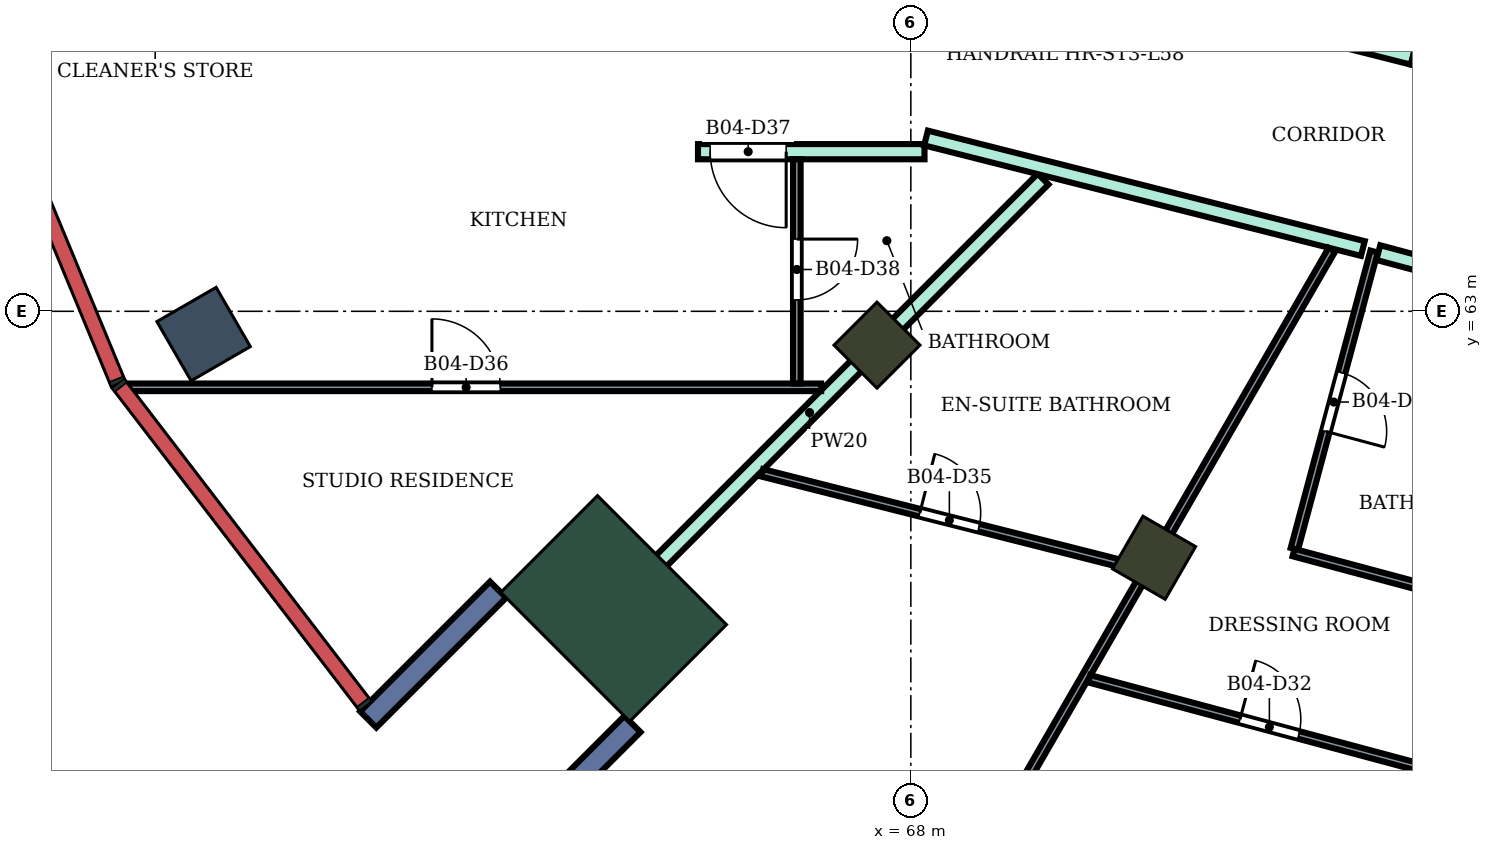
"""IFC4 building model, lengths in metres.
Left out: names, types, materials, properties, quantities, classifications, styles, units other than length and angle.
Written with IfcOpenShell. Run it as: python <this file> out.ifc"""

import sys

from ifc_helpers import new_model, si_unit, direction, frame, frame_2d, origin, origin_2d, place, context, subcontext, project, spatial, rectangle, extrude, element, fill, save


model = new_model("IFC4")
c1 = context("Model", 3, precision=1e-05, world=origin(), true_north=direction((0.0, 1.0)))
c2 = subcontext(c1, "Body", "Model", "MODEL_VIEW")
j1 = project(units=[si_unit("LENGTHUNIT", "METRE"), si_unit("PLANEANGLEUNIT", "RADIAN")], contexts=[c1])
p1 = place(None, origin())
s1 = spatial("IfcSite", under=j1, at=p1, CompositionType="ELEMENT")
p2 = place(p1, origin())
s2 = spatial("IfcBuilding", under=s1, at=p2, CompositionType="ELEMENT")
p3 = place(p2, frame((0.0, 0.0, 254.1)))
s3 = spatial("IfcBuildingStorey", under=s2, at=p3, CompositionType="ELEMENT", Elevation=254.1)
p4 = place(p3, frame((58.696, 62.7, 0.0), z_axis=(0.0, 0.0, 1.0), x_axis=(-0.866025403784, -0.5, 0.0)))
e1 = element("IfcColumn", 1, at=p4, inside=s3, PredefinedType="COLUMN", context=c2, shape_type="SweptSolid", body=[
    extrude(rectangle(XDim=0.9, YDim=0.9, at=origin_2d()), origin(), (0.0, 0.0, 1.0), 4.2),
])
for number, where, z_axis, x_axis in (
    (2, (67.555, 62.555, 0.0), (0.0, 0.0, 1.0), (-0.707, -0.707, 0.0)),
    (3, (71.2, 59.758, 0.0), (0.0, 0.0, 1.0), (-0.5, -0.866, 0.0)),
):
    element("IfcColumn", number, at=place(p3, frame(where, z_axis=z_axis, x_axis=x_axis)), inside=s3, PredefinedType="COLUMN", context=c2, shape_type="SweptSolid", body=[
        extrude(rectangle(XDim=0.8, YDim=0.8, at=origin_2d()), origin(), (0.0, 0.0, 1.0), 4.2),
    ])
p5 = place(p3, frame((64.09, 59.09, 0.0), z_axis=(0.0, 0.0, 1.0), x_axis=(-0.707106781187, -0.707106781187, 0.0)))
e4 = element("IfcColumn", 4, at=p5, inside=s3, PredefinedType="COLUMN", context=c2, shape_type="SweptSolid", body=[
    extrude(rectangle(XDim=1.8, YDim=2.4, at=origin_2d()), origin(), (0.0, 0.0, 1.0), 4.2),
])
for number, where, z_axis, x_axis in (
    (5, (62.57, 59.338, 0.0), (0.0, 0.0, 1.0), (-0.707, -0.707, 0.0)),
    (6, (64.338, 57.57, 0.0), (0.0, 0.0, 1.0), (-0.707, -0.707, 0.0)),
):
    element("IfcWall", number, at=place(p3, frame(where, z_axis=z_axis, x_axis=x_axis)), inside=s3, PredefinedType="NOTDEFINED", context=c2, shape_type="SweptSolid", body=[
        extrude(rectangle(XDim=2.416, YDim=0.3, at=frame_2d((1.208, 0.0))), origin(), (0.0, 0.0, 1.0), 4.2),
    ])
p6 = place(p3, frame((63.596, 58.596, 0.0), z_axis=(0.0, 0.0, 1.0), x_axis=(0.707106781187, 0.707106781187, 0.0)))
e7 = element("IfcWall", 7, at=p6, inside=s3, PredefinedType="PARTITIONING", context=c2, shape_type="SweptSolid", body=[
    extrude(rectangle(XDim=8.689, YDim=0.2, at=frame_2d((4.344, 0.0))), origin(), (0.0, 0.0, 1.0), 3.75),
])
p7 = place(p3, frame((65.2, 65.1, 0.0), z_axis=(0.0, 0.0, 1.0), x_axis=(1.0, 0.0, 0.0)))
e8 = element("IfcWall", 8, at=p7, inside=s3, PredefinedType="PARTITIONING", context=c2, shape_type="SweptSolid", body=[
    extrude(rectangle(XDim=2.98, YDim=0.2, at=frame_2d((1.49, 0.0))), origin(), (0.0, 0.0, 1.0), 3.75),
])
p8 = place(p7, frame((0.16, 0.0, 0.0)))
e9 = element("IfcOpeningElement", 9, at=p8, cuts=e8, PredefinedType="OPENING", context=c2, shape_type="SweptSolid", body=[
    extrude(rectangle(XDim=1.0, YDim=2.1, at=frame_2d((0.5, 1.05))), frame((0.0, 0.11, 0.0), z_axis=(0.0, -1.0, 0.0), x_axis=(1.0, 0.0, 0.0)), (0.0, 0.0, 1.0), 0.22),
])
p9 = place(p3, frame((68.2, 65.28, 0.0), z_axis=(0.0, 0.0, 1.0), x_axis=(0.969450596516, -0.245286650503, 0.0)))
e10 = element("IfcWall", 10, at=p9, inside=s3, PredefinedType="PARTITIONING", context=c2, shape_type="SweptSolid", body=[
    extrude(rectangle(XDim=5.928, YDim=0.2, at=frame_2d((2.964, 0.0))), origin(), (0.0, 0.0, 1.0), 3.75),
])
p10 = place(p3, frame((72.1, 66.975, 0.0), z_axis=(0.0, 0.0, 1.0), x_axis=(0.969471314457, -0.245204752086, 0.0)))
e11 = element("IfcWall", 11, at=p10, inside=s3, PredefinedType="PARTITIONING", context=c2, shape_type="SweptSolid", body=[
    extrude(rectangle(XDim=2.582, YDim=0.2, at=frame_2d((1.291, 0.0))), origin(), (0.0, 0.0, 1.0), 3.75),
])
p11 = place(p10, frame((0.841, 0.0, 0.0)))
e12 = element("IfcOpeningElement", 12, at=p11, cuts=e11, PredefinedType="OPENING", context=c2, shape_type="SweptSolid", body=[
    extrude(rectangle(XDim=0.9, YDim=2.1, at=frame_2d((0.45, 1.05))), frame((0.0, 0.11, 0.0), z_axis=(0.0, -1.0, 0.0), x_axis=(1.0, 0.0, 0.0)), (0.0, 0.0, 1.0), 0.22),
])
p12 = place(p3, frame((74.15, 63.772, 0.0), z_axis=(0.0, 0.0, 1.0), x_axis=(0.965801140662, -0.259283930655, 0.0)))
e13 = element("IfcWall", 13, at=p12, inside=s3, PredefinedType="PARTITIONING", context=c2, shape_type="SweptSolid", body=[
    extrude(rectangle(XDim=6.006, YDim=0.2, at=frame_2d((3.003, 0.0))), origin(), (0.0, 0.0, 1.0), 3.75),
])
p13 = place(p3, frame((74.603, 66.342, 0.0), z_axis=(0.0, 0.0, 1.0), x_axis=(0.965895298152, -0.258932950796, 0.0)))
e14 = element("IfcWall", 14, at=p13, inside=s3, PredefinedType="PARTITIONING", context=c2, shape_type="SweptSolid", body=[
    extrude(rectangle(XDim=5.538, YDim=0.2, at=frame_2d((2.769, 0.0))), origin(), (0.0, 0.0, 1.0), 3.75),
])
p14 = place(p13, frame((2.062, 0.0, 0.0)))
e15 = element("IfcOpeningElement", 15, at=p14, cuts=e14, PredefinedType="OPENING", context=c2, shape_type="SweptSolid", body=[
    extrude(rectangle(XDim=1.8, YDim=2.1, at=frame_2d((0.9, 1.05))), frame((0.0, 0.11, 0.0), z_axis=(0.0, -1.0, 0.0), x_axis=(1.0, 0.0, 0.0)), (0.0, 0.0, 1.0), 0.22),
])
p15 = place(p3, frame((57.668, 62.0, 0.0), z_axis=(0.0, 0.0, 1.0), x_axis=(1.0, 0.0, 0.0)))
e16 = element("IfcWall", 16, at=p15, inside=s3, PredefinedType="PARTITIONING", context=c2, shape_type="SweptSolid", body=[
    extrude(rectangle(XDim=9.152, YDim=0.1, at=frame_2d((4.576, 0.0))), origin(), (0.0, 0.0, 1.0), 3.75),
])
p16 = place(p15, frame((4.031, 0.0, 0.0)))
e17 = element("IfcOpeningElement", 17, at=p16, cuts=e16, PredefinedType="OPENING", context=c2, shape_type="SweptSolid", body=[
    extrude(rectangle(XDim=0.9, YDim=2.1, at=frame_2d((0.45, 1.05))), frame((0.0, 0.06, 0.0), z_axis=(0.0, -1.0, 0.0), x_axis=(1.0, 0.0, 0.0)), (0.0, 0.0, 1.0), 0.12),
])
p17 = place(p3, frame((66.045, 60.875, 0.0), z_axis=(0.0, 0.0, 1.0), x_axis=(0.969437033678, -0.245340248908, 0.0)))
e18 = element("IfcWall", 18, at=p17, inside=s3, PredefinedType="PARTITIONING", context=c2, shape_type="SweptSolid", body=[
    extrude(rectangle(XDim=5.16, YDim=0.1, at=frame_2d((2.58, 0.0))), origin(), (0.0, 0.0, 1.0), 3.75),
])
p18 = place(p17, frame((2.14, 0.0, 0.0)))
e19 = element("IfcOpeningElement", 19, at=p18, cuts=e18, PredefinedType="OPENING", context=c2, shape_type="SweptSolid", body=[
    extrude(rectangle(XDim=0.8, YDim=2.1, at=frame_2d((0.4, 1.05))), frame((0.0, 0.06, 0.0), z_axis=(0.0, -1.0, 0.0), x_axis=(1.0, 0.0, 0.0)), (0.0, 0.0, 1.0), 0.12),
])
p19 = place(p3, frame((66.5, 62.05, 0.0), z_axis=(0.0, 0.0, 1.0), x_axis=(0.0, 1.0, 0.0)))
e20 = element("IfcWall", 20, at=p19, inside=s3, PredefinedType="PARTITIONING", context=c2, shape_type="SweptSolid", body=[
    extrude(rectangle(XDim=2.95, YDim=0.1, at=frame_2d((1.475, 0.0))), origin(), (0.0, 0.0, 1.0), 3.75),
])
p20 = place(p19, frame((1.1, 0.0, 0.0)))
e21 = element("IfcOpeningElement", 21, at=p20, cuts=e20, PredefinedType="OPENING", context=c2, shape_type="SweptSolid", body=[
    extrude(rectangle(XDim=0.8, YDim=2.1, at=frame_2d((0.4, 1.05))), frame((0.0, 0.06, 0.0), z_axis=(0.0, -1.0, 0.0), x_axis=(1.0, 0.0, 0.0)), (0.0, 0.0, 1.0), 0.12),
])
p21 = place(p3, frame((67.101, 52.659, 0.0), z_axis=(0.0, 0.0, 1.0), x_axis=(0.499999276258, 0.866025821636, 0.0)))
e22 = element("IfcWall", 22, at=p21, inside=s3, PredefinedType="PARTITIONING", context=c2, shape_type="SweptSolid", body=[
    extrude(rectangle(XDim=12.876, YDim=0.1, at=frame_2d((6.438, 0.0))), origin(), (0.0, 0.0, 1.0), 3.75),
])
p22 = place(p21, frame((2.763, 0.0, 0.0)))
e23 = element("IfcOpeningElement", 23, at=p22, cuts=e22, PredefinedType="OPENING", context=c2, shape_type="SweptSolid", body=[
    extrude(rectangle(XDim=0.9, YDim=2.1, at=frame_2d((0.45, 1.05))), frame((0.0, 0.06, 0.0), z_axis=(0.0, -1.0, 0.0), x_axis=(1.0, 0.0, 0.0)), (0.0, 0.0, 1.0), 0.12),
])
p23 = place(p3, frame((70.347, 58.165, 0.0), z_axis=(0.0, 0.0, 1.0), x_axis=(0.965891429463, -0.2589473817, 0.0)))
e24 = element("IfcWall", 24, at=p23, inside=s3, PredefinedType="PARTITIONING", context=c2, shape_type="SweptSolid", body=[
    extrude(rectangle(XDim=9.934, YDim=0.1, at=frame_2d((4.967, 0.0))), origin(), (0.0, 0.0, 1.0), 3.75),
])
p24 = place(p23, frame((7.081, 0.0, 0.0)))
e25 = element("IfcOpeningElement", 25, at=p24, cuts=e24, PredefinedType="OPENING", context=c2, shape_type="SweptSolid", body=[
    extrude(rectangle(XDim=0.8, YDim=2.1, at=frame_2d((0.4, 1.05))), frame((0.0, 0.06, 0.0), z_axis=(0.0, -1.0, 0.0), x_axis=(1.0, 0.0, 0.0)), (0.0, 0.0, 1.0), 0.12),
])
p25 = place(p23, frame((2.054, 0.0, 0.0)))
e26 = element("IfcOpeningElement", 26, at=p25, cuts=e24, PredefinedType="OPENING", context=c2, shape_type="SweptSolid", body=[
    extrude(rectangle(XDim=0.8, YDim=2.1, at=frame_2d((0.4, 1.05))), frame((0.0, 0.06, 0.0), z_axis=(0.0, -1.0, 0.0), x_axis=(1.0, 0.0, 0.0)), (0.0, 0.0, 1.0), 0.12),
])
p26 = place(p3, frame((73.046, 59.875, 0.0), z_axis=(0.0, 0.0, 1.0), x_axis=(0.258983170584, 0.965881834053, 0.0)))
e27 = element("IfcWall", 27, at=p26, inside=s3, PredefinedType="PARTITIONING", context=c2, shape_type="SweptSolid", body=[
    extrude(rectangle(XDim=4.05, YDim=0.1, at=frame_2d((2.025, 0.0))), origin(), (0.0, 0.0, 1.0), 3.75),
])
p27 = place(p26, frame((1.6, 0.0, 0.0)))
e28 = element("IfcOpeningElement", 28, at=p27, cuts=e27, PredefinedType="OPENING", context=c2, shape_type="SweptSolid", body=[
    extrude(rectangle(XDim=0.8, YDim=2.1, at=frame_2d((0.4, 1.05))), frame((0.0, 0.06, 0.0), z_axis=(0.0, -1.0, 0.0), x_axis=(1.0, 0.0, 0.0)), (0.0, 0.0, 1.0), 0.12),
])
p28 = place(p3, frame((73.035, 59.826, 0.0), z_axis=(0.0, 0.0, 1.0), x_axis=(0.965905892915, -0.258893426011, 0.0)))
e29 = element("IfcWall", 29, at=p28, inside=s3, PredefinedType="PARTITIONING", context=c2, shape_type="SweptSolid", body=[
    extrude(rectangle(XDim=2.74, YDim=0.1, at=frame_2d((1.37, 0.0))), origin(), (0.0, 0.0, 1.0), 3.75),
])
p29 = place(p3, frame((73.322, 50.081, 0.0), z_axis=(0.0, 0.0, 1.0), x_axis=(0.258871185824, 0.965911853717, 0.0)))
e30 = element("IfcWall", 30, at=p29, inside=s3, PredefinedType="PARTITIONING", context=c2, shape_type="SweptSolid", body=[
    extrude(rectangle(XDim=13.338, YDim=0.1, at=frame_2d((6.669, 0.0))), origin(), (0.0, 0.0, 1.0), 3.75),
])
p30 = place(p29, frame((3.094, 0.0, 0.0)))
e31 = element("IfcOpeningElement", 31, at=p30, cuts=e30, PredefinedType="OPENING", context=c2, shape_type="SweptSolid", body=[
    extrude(rectangle(XDim=0.9, YDim=2.1, at=frame_2d((0.45, 1.05))), frame((0.0, 0.06, 0.0), z_axis=(0.0, -1.0, 0.0), x_axis=(1.0, 0.0, 0.0)), (0.0, 0.0, 1.0), 0.12),
])
p31 = place(p25, origin())
e32 = element("IfcDoor", 32, at=p31, inside=s3, OperationType="SINGLE_SWING_LEFT", PredefinedType="DOOR", context=c2, shape_type="SweptSolid", body=[
    extrude(rectangle(XDim=0.8, YDim=2.1, at=frame_2d((0.4, 1.05))), frame((0.0, 0.025, 0.0), z_axis=(0.0, -1.0, 0.0), x_axis=(1.0, 0.0, 0.0)), (0.0, 0.0, 1.0), 0.05),
])
fill(e26, e32)
p32 = place(p27, frame((0.8, 0.0, 0.0), z_axis=(0.0, 0.0, 1.0), x_axis=(-1.0, 0.0, 0.0)))
e33 = element("IfcDoor", 33, at=p32, inside=s3, OperationType="SINGLE_SWING_RIGHT", PredefinedType="DOOR", context=c2, shape_type="SweptSolid", body=[
    extrude(rectangle(XDim=0.8, YDim=2.1, at=frame_2d((0.4, 1.05))), frame((0.0, 0.025, 0.0), z_axis=(0.0, -1.0, 0.0), x_axis=(1.0, 0.0, 0.0)), (0.0, 0.0, 1.0), 0.05),
])
fill(e28, e33)
p33 = place(p18, origin())
e34 = element("IfcDoor", 34, at=p33, inside=s3, OperationType="SINGLE_SWING_LEFT", PredefinedType="DOOR", context=c2, shape_type="SweptSolid", body=[
    extrude(rectangle(XDim=0.8, YDim=2.1, at=frame_2d((0.4, 1.05))), frame((0.0, 0.025, 0.0), z_axis=(0.0, -1.0, 0.0), x_axis=(1.0, 0.0, 0.0)), (0.0, 0.0, 1.0), 0.05),
])
fill(e19, e34)
p34 = place(p16, origin())
e35 = element("IfcDoor", 35, at=p34, inside=s3, OperationType="SINGLE_SWING_LEFT", PredefinedType="DOOR", context=c2, shape_type="SweptSolid", body=[
    extrude(rectangle(XDim=0.9, YDim=2.1, at=frame_2d((0.45, 1.05))), frame((0.0, 0.025, 0.0), z_axis=(0.0, -1.0, 0.0), x_axis=(1.0, 0.0, 0.0)), (0.0, 0.0, 1.0), 0.05),
])
fill(e17, e35)
p35 = place(p8, frame((1.0, 0.0, 0.0), z_axis=(0.0, 0.0, 1.0), x_axis=(-1.0, 0.0, 0.0)))
e36 = element("IfcDoor", 36, at=p35, inside=s3, OperationType="SINGLE_SWING_LEFT", PredefinedType="DOOR", context=c2, shape_type="SweptSolid", body=[
    extrude(rectangle(XDim=1.0, YDim=2.1, at=frame_2d((0.5, 1.05))), frame((0.0, 0.025, 0.0), z_axis=(0.0, -1.0, 0.0), x_axis=(1.0, 0.0, 0.0)), (0.0, 0.0, 1.0), 0.05),
])
fill(e9, e36)
p36 = place(p20, frame((0.8, 0.0, 0.0), z_axis=(0.0, 0.0, 1.0), x_axis=(-1.0, 0.0, 0.0)))
e37 = element("IfcDoor", 37, at=p36, inside=s3, OperationType="SINGLE_SWING_LEFT", PredefinedType="DOOR", context=c2, shape_type="SweptSolid", body=[
    extrude(rectangle(XDim=0.8, YDim=2.1, at=frame_2d((0.4, 1.05))), frame((0.0, 0.025, 0.0), z_axis=(0.0, -1.0, 0.0), x_axis=(1.0, 0.0, 0.0)), (0.0, 0.0, 1.0), 0.05),
])
fill(e21, e37)
save(model, sys.argv[1])
